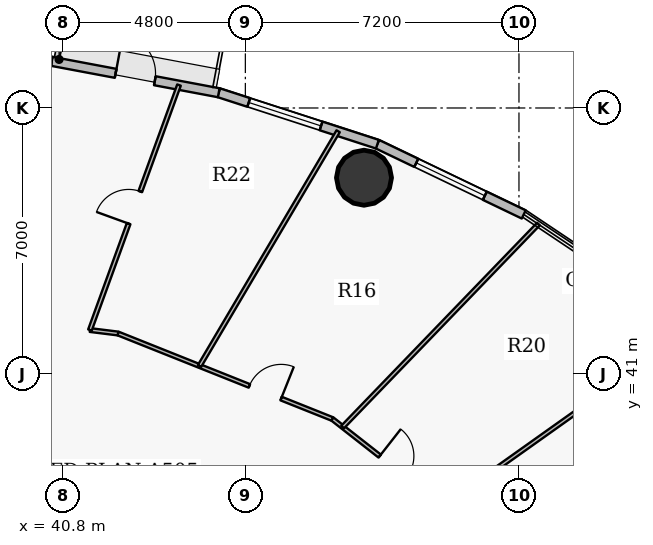
"""IFC4 building model, lengths in metres.
Left out: names, types, materials, properties, quantities, classifications, styles, units other than length and angle.
Written with IfcOpenShell. Run it as: python <this file> out.ifc"""

import sys

from ifc_helpers import new_model, si_unit, direction, frame, frame_2d, origin, origin_2d, place, context, subcontext, project, spatial, rectangle, hollow_circle, extrude, source, transform, mapped, element, fill, save


model = new_model("IFC4")
c1 = context("Model", 3, precision=1e-05, world=origin(), true_north=direction((0.0, 1.0)))
c2 = subcontext(c1, "Body", "Model", "MODEL_VIEW")
j1 = project(units=[si_unit("LENGTHUNIT", "METRE"), si_unit("PLANEANGLEUNIT", "RADIAN")], contexts=[c1])
p1 = place(None, origin())
s1 = spatial("IfcSite", under=j1, at=p1, CompositionType="ELEMENT")
p2 = place(p1, origin())
s2 = spatial("IfcBuilding", under=s1, at=p2, CompositionType="ELEMENT")
p3 = place(p2, frame((0.0, 0.0, 127.2)))
s3 = spatial("IfcBuildingStorey", under=s2, at=p3, CompositionType="ELEMENT", Elevation=127.2)
p4 = place(p3, frame((48.722, 46.165, 0.0), z_axis=(0.0, 0.0, 1.0), x_axis=(1.0, 0.0, 0.0)))
e1 = element("IfcColumn", 1, at=p4, inside=s3, PredefinedType="COLUMN", context=c2, shape_type="SweptSolid", body=[
    extrude(hollow_circle(Radius=0.725, WallThickness=0.042, at=origin_2d()), origin(), (0.0, 0.0, 1.0), 3.75),
])
p5 = place(p3, frame((49.074, 47.047, 0.0), z_axis=(0.0, 0.0, 1.0), x_axis=(0.901589935876, -0.432591709962, 0.0)))
e2 = element("IfcWall", 2, at=p5, inside=s3, PredefinedType="SOLIDWALL", context=c2, shape_type="SweptSolid", body=[
    extrude(rectangle(XDim=4.272, YDim=0.24, at=frame_2d((2.136, 0.0))), origin(), (0.0, 0.0, 1.0), 3.5),
])
p6 = place(p5, frame((1.136, 0.0, 0.9)))
e3 = element("IfcOpeningElement", 3, at=p6, cuts=e2, PredefinedType="OPENING", context=c2, shape_type="SweptSolid", body=[
    extrude(rectangle(XDim=2.0, YDim=1.75, at=origin_2d()), frame((1.0, 0.13, 0.875), z_axis=(0.0, -1.0, 0.0), x_axis=(1.0, 0.0, 0.0)), (0.0, 0.0, 1.0), 0.26),
])
p7 = place(p3, frame((44.9, 48.401, 0.0), z_axis=(0.0, 0.0, 1.0), x_axis=(0.951211346073, -0.308540070495, 0.0)))
e4 = element("IfcWall", 4, at=p7, inside=s3, PredefinedType="SOLIDWALL", context=c2, shape_type="SweptSolid", body=[
    extrude(rectangle(XDim=4.388, YDim=0.24, at=frame_2d((2.194, 0.0))), origin(), (0.0, 0.0, 1.0), 3.5),
])
p8 = place(p7, frame((0.83, 0.0, 0.9)))
e5 = element("IfcOpeningElement", 5, at=p8, cuts=e4, PredefinedType="OPENING", context=c2, shape_type="SweptSolid", body=[
    extrude(rectangle(XDim=2.0, YDim=1.75, at=origin_2d()), frame((1.0, 0.13, 0.875), z_axis=(0.0, -1.0, 0.0), x_axis=(1.0, 0.0, 0.0)), (0.0, 0.0, 1.0), 0.26),
])
p9 = place(p3, frame((40.506, 49.227, 0.0), z_axis=(0.0, 0.0, 1.0), x_axis=(0.982789252177, -0.184730305596, 0.0)))
e6 = element("IfcWall", 6, at=p9, inside=s3, PredefinedType="SOLIDWALL", context=c2, shape_type="SweptSolid", body=[
    extrude(rectangle(XDim=4.471, YDim=0.24, at=frame_2d((2.235, 0.0))), origin(), (0.0, 0.0, 1.0), 3.5),
])
p10 = place(p9, frame((1.711, 0.0, 0.0)))
e7 = element("IfcOpeningElement", 7, at=p10, cuts=e6, PredefinedType="OPENING", context=c2, shape_type="SweptSolid", body=[
    extrude(rectangle(XDim=1.05, YDim=2.15, at=origin_2d()), frame((0.525, 0.13, 1.075), z_axis=(0.0, -1.0, 0.0), x_axis=(1.0, 0.0, 0.0)), (0.0, 0.0, 1.0), 0.26),
])
p11 = place(p3, frame((36.0, 49.505, 0.0), z_axis=(0.0, 0.0, 1.0), x_axis=(0.998107531589, -0.061492726276, 0.0)))
e8 = element("IfcWall", 8, at=p11, inside=s3, PredefinedType="SOLIDWALL", context=c2, shape_type="SweptSolid", body=[
    extrude(rectangle(XDim=4.514, YDim=0.24, at=frame_2d((2.257, 0.0))), origin(), (0.0, 0.0, 1.0), 3.5),
])
p12 = place(p11, frame((1.257, 0.0, 0.9)))
e9 = element("IfcOpeningElement", 9, at=p12, cuts=e8, PredefinedType="OPENING", context=c2, shape_type="SweptSolid", body=[
    extrude(rectangle(XDim=2.0, YDim=1.75, at=origin_2d()), frame((1.0, 0.13, 0.875), z_axis=(0.0, -1.0, 0.0), x_axis=(1.0, 0.0, 0.0)), (0.0, 0.0, 1.0), 0.26),
])
p13 = place(p3, frame((41.511, 42.157, 0.0), z_axis=(0.0, 0.0, 1.0), x_axis=(0.992403212837, -0.123027895822, 0.0)))
e10 = element("IfcWall", 10, at=p13, inside=s3, PredefinedType="PARTITIONING", context=c2, shape_type="SweptSolid", body=[
    extrude(rectangle(XDim=0.746, YDim=0.1, at=frame_2d((0.373, 0.0))), origin(), (0.0, 0.0, 1.0), 3.5),
])
p14 = place(p3, frame((41.511, 42.157, 0.0), z_axis=(0.0, 0.0, 1.0), x_axis=(0.341680179237, 0.939816287961, 0.0)))
e11 = element("IfcWall", 11, at=p14, inside=s3, PredefinedType="PARTITIONING", context=c2, shape_type="SweptSolid", body=[
    extrude(rectangle(XDim=6.858, YDim=0.1, at=frame_2d((3.429, 0.0))), origin(), (0.0, 0.0, 1.0), 2.935),
])
p15 = place(p14, frame((2.979, 0.0, 0.0)))
e12 = element("IfcOpeningElement", 12, at=p15, cuts=e11, PredefinedType="OPENING", context=c2, shape_type="SweptSolid", body=[
    extrude(rectangle(XDim=0.9, YDim=2.1, at=origin_2d()), frame((0.45, 0.06, 1.05), z_axis=(0.0, -1.0, 0.0), x_axis=(1.0, 0.0, 0.0)), (0.0, 0.0, 1.0), 0.12),
])
p16 = place(p3, frame((42.251, 42.066, 0.0), z_axis=(0.0, 0.0, 1.0), x_axis=(0.928803554156, -0.370572473055, 0.0)))
e13 = element("IfcWall", 13, at=p16, inside=s3, PredefinedType="PARTITIONING", context=c2, shape_type="SweptSolid", body=[
    extrude(rectangle(XDim=6.072, YDim=0.1, at=frame_2d((3.036, 0.0))), origin(), (0.0, 0.0, 1.0), 2.935),
])
p17 = place(p16, frame((3.719, 0.0, 0.0)))
e14 = element("IfcOpeningElement", 14, at=p17, cuts=e13, PredefinedType="OPENING", context=c2, shape_type="SweptSolid", body=[
    extrude(rectangle(XDim=0.9, YDim=2.1, at=origin_2d()), frame((0.45, 0.06, 1.05), z_axis=(0.0, -1.0, 0.0), x_axis=(1.0, 0.0, 0.0)), (0.0, 0.0, 1.0), 0.12),
])
p18 = place(p3, frame((44.394, 41.211, 0.0), z_axis=(0.0, 0.0, 1.0), x_axis=(0.508542397454, 0.861036950422, 0.0)))
e15 = element("IfcWall", 15, at=p18, inside=s3, PredefinedType="PARTITIONING", context=c2, shape_type="SweptSolid", body=[
    extrude(rectangle(XDim=7.173, YDim=0.1, at=frame_2d((3.587, 0.0))), origin(), (0.0, 0.0, 1.0), 2.935),
])
p19 = place(p3, frame((47.891, 39.816, 0.0), z_axis=(0.0, 0.0, 1.0), x_axis=(0.787345480673, -0.616512038864, 0.0)))
e16 = element("IfcWall", 16, at=p19, inside=s3, PredefinedType="PARTITIONING", context=c2, shape_type="SweptSolid", body=[
    extrude(rectangle(XDim=5.685, YDim=0.1, at=frame_2d((2.843, 0.0))), origin(), (0.0, 0.0, 1.0), 2.935),
])
p20 = place(p19, frame((1.58, 0.0, 0.0)))
e17 = element("IfcOpeningElement", 17, at=p20, cuts=e16, PredefinedType="OPENING", context=c2, shape_type="SweptSolid", body=[
    extrude(rectangle(XDim=0.9, YDim=2.1, at=origin_2d()), frame((0.45, 0.06, 1.05), z_axis=(0.0, -1.0, 0.0), x_axis=(1.0, 0.0, 0.0)), (0.0, 0.0, 1.0), 0.12),
])
p21 = place(p3, frame((48.16, 39.605, 0.0), z_axis=(0.0, 0.0, 1.0), x_axis=(0.694278615756, 0.719706331571, 0.0)))
e18 = element("IfcWall", 18, at=p21, inside=s3, PredefinedType="PARTITIONING", context=c2, shape_type="SweptSolid", body=[
    extrude(rectangle(XDim=7.422, YDim=0.1, at=frame_2d((3.711, 0.0))), origin(), (0.0, 0.0, 1.0), 2.935),
])
p22 = place(p3, frame((50.819, 37.523, 0.0), z_axis=(0.0, 0.0, 1.0), x_axis=(0.815321486624, 0.579008526233, 0.0)))
e19 = element("IfcWall", 19, at=p22, inside=s3, PredefinedType="PARTITIONING", context=c2, shape_type="SweptSolid", body=[
    extrude(rectangle(XDim=7.89, YDim=0.1, at=frame_2d((3.945, 0.0))), origin(), (0.0, 0.0, 1.0), 2.935),
])
m1 = source(origin(), c2, "Body", "SweptSolid", [
    extrude(rectangle(XDim=2.0, YDim=1.75, at=origin_2d()), frame((1.0, 0.03, 0.875), z_axis=(0.0, -1.0, 0.0), x_axis=(1.0, 0.0, 0.0)), (0.0, 0.0, 1.0), 0.06),
])
p23 = place(p6, origin())
e20 = element("IfcWindow", 20, at=p23, inside=s3, PartitioningType="DOUBLE_PANEL_VERTICAL", PredefinedType="WINDOW", context=c2, shape_type="MappedRepresentation", body=[
    mapped(m1, transform((0.0, 0.0, 0.0), x_axis=(1.0, 0.0, 0.0), y_axis=(0.0, 1.0, 0.0), z_axis=(0.0, 0.0, 1.0), scale=1.0)),
])
fill(e3, e20)
p24 = place(p8, origin())
e21 = element("IfcWindow", 21, at=p24, inside=s3, PartitioningType="DOUBLE_PANEL_VERTICAL", PredefinedType="WINDOW", context=c2, shape_type="MappedRepresentation", body=[
    mapped(m1, transform((0.0, 0.0, 0.0), x_axis=(1.0, 0.0, 0.0), y_axis=(0.0, 1.0, 0.0), z_axis=(0.0, 0.0, 1.0), scale=1.0)),
])
fill(e5, e21)
m2 = source(origin(), c2, "Body", "SweptSolid", [
    extrude(rectangle(XDim=1.05, YDim=2.15, at=origin_2d()), frame((0.525, 0.025, 1.075), z_axis=(0.0, -1.0, 0.0), x_axis=(1.0, 0.0, 0.0)), (0.0, 0.0, 1.0), 0.05),
])
p25 = place(p10, origin())
e22 = element("IfcDoor", 22, at=p25, inside=s3, OperationType="SINGLE_SWING_LEFT", PredefinedType="DOOR", context=c2, shape_type="MappedRepresentation", body=[
    mapped(m2, transform((0.0, 0.0, 0.0), x_axis=(1.0, 0.0, 0.0), y_axis=(0.0, 1.0, 0.0), z_axis=(0.0, 0.0, 1.0), scale=1.0)),
])
fill(e7, e22)
m3 = source(origin(), c2, "Body", "SweptSolid", [
    extrude(rectangle(XDim=0.9, YDim=2.1, at=origin_2d()), frame((0.45, 0.025, 1.05), z_axis=(0.0, -1.0, 0.0), x_axis=(1.0, 0.0, 0.0)), (0.0, 0.0, 1.0), 0.05),
])
p26 = place(p20, origin())
e23 = element("IfcDoor", 23, at=p26, inside=s3, OperationType="SINGLE_SWING_LEFT", PredefinedType="DOOR", context=c2, shape_type="MappedRepresentation", body=[
    mapped(m3, transform((0.0, 0.0, 0.0), x_axis=(1.0, 0.0, 0.0), y_axis=(0.0, 1.0, 0.0), z_axis=(0.0, 0.0, 1.0), scale=1.0)),
])
fill(e17, e23)
p27 = place(p17, origin())
e24 = element("IfcDoor", 24, at=p27, inside=s3, OperationType="SINGLE_SWING_RIGHT", PredefinedType="DOOR", context=c2, shape_type="MappedRepresentation", body=[
    mapped(m3, transform((0.0, 0.0, 0.0), x_axis=(1.0, 0.0, 0.0), y_axis=(0.0, 1.0, 0.0), z_axis=(0.0, 0.0, 1.0), scale=1.0)),
])
fill(e14, e24)
p28 = place(p15, origin())
e25 = element("IfcDoor", 25, at=p28, inside=s3, OperationType="SINGLE_SWING_LEFT", PredefinedType="DOOR", context=c2, shape_type="MappedRepresentation", body=[
    mapped(m3, transform((0.0, 0.0, 0.0), x_axis=(1.0, 0.0, 0.0), y_axis=(0.0, 1.0, 0.0), z_axis=(0.0, 0.0, 1.0), scale=1.0)),
])
fill(e12, e25)
save(model, sys.argv[1])
